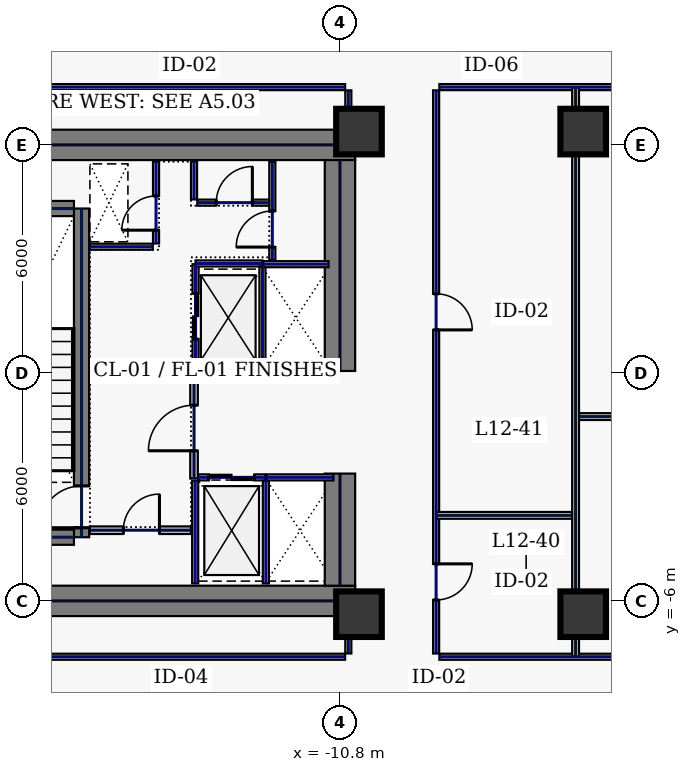
"""IFC4 building model, lengths in metres.
Left out: names, types, materials, properties, quantities, classifications, styles, units other than length and angle.
Written with IfcOpenShell. Run it as: python <this file> out.ifc"""

import sys

from ifc_helpers import new_model, si_unit, direction, frame, frame_2d, origin, origin_2d, place, context, subcontext, project, spatial, rectangle, hollow_rectangle, extrude, element, fill, save


model = new_model("IFC4")
c1 = context("Model", 3, precision=1e-05, world=origin(), true_north=direction((0.0, 1.0)))
c2 = subcontext(c1, "Body", "Model", "MODEL_VIEW")
j1 = project(units=[si_unit("LENGTHUNIT", "METRE"), si_unit("PLANEANGLEUNIT", "RADIAN")], contexts=[c1])
p1 = place(None, origin())
s1 = spatial("IfcSite", under=j1, at=p1, CompositionType="ELEMENT")
p2 = place(p1, origin())
s2 = spatial("IfcBuilding", under=s1, at=p2, CompositionType="ELEMENT")
p3 = place(p2, frame((0.0, 0.0, 59.4)))
s3 = spatial("IfcBuildingStorey", under=s2, at=p3, CompositionType="ELEMENT", Elevation=59.4)
for number, where, z_axis, x_axis in (
    (1, (-22.0, 6.0, 0.0), (0.0, 0.0, 1.0), (1.0, 0.0, 0.0)),
    (2, (-22.0, -6.0, 0.0), (0.0, 0.0, 1.0), (1.0, 0.0, 0.0)),
):
    element("IfcWall", number, at=place(p3, frame(where, z_axis=z_axis, x_axis=x_axis)), inside=s3, PredefinedType="SHEAR", context=c2, shape_type="SweptSolid", body=[
        extrude(rectangle(XDim=11.6, YDim=0.8, at=frame_2d((5.8, 0.0))), origin(), (0.0, 0.0, 1.0), 3.74),
    ])
p4 = place(p3, frame((-10.8, -5.6, 0.0), z_axis=(0.0, 0.0, 1.0), x_axis=(0.0, 1.0, 0.0)))
e3 = element("IfcWall", 3, at=p4, inside=s3, PredefinedType="SHEAR", context=c2, shape_type="SweptSolid", body=[
    extrude(rectangle(XDim=2.95, YDim=0.8, at=frame_2d((1.475, 0.0))), origin(), (0.0, 0.0, 1.0), 3.74),
])
p5 = place(p3, frame((-10.8, 0.05, 0.0), z_axis=(0.0, 0.0, 1.0), x_axis=(0.0, 1.0, 0.0)))
e4 = element("IfcWall", 4, at=p5, inside=s3, PredefinedType="SHEAR", context=c2, shape_type="SweptSolid", body=[
    extrude(rectangle(XDim=5.55, YDim=0.8, at=frame_2d((2.775, 0.0))), origin(), (0.0, 0.0, 1.0), 3.74),
])
p6 = place(p3, frame((-17.6, -4.325, 0.0), z_axis=(0.0, 0.0, 1.0), x_axis=(0.0, 1.0, 0.0)))
e5 = element("IfcWall", 5, at=p6, inside=s3, PredefinedType="SHEAR", context=c2, shape_type="SweptSolid", body=[
    extrude(rectangle(XDim=8.65, YDim=0.4, at=frame_2d((4.325, 0.0))), origin(), (0.0, 0.0, 1.0), 3.74),
])
p7 = place(p6, frame((0.25, 0.0, 0.0)))
e6 = element("IfcOpeningElement", 6, at=p7, cuts=e5, PredefinedType="OPENING", context=c2, shape_type="SweptSolid", body=[
    extrude(rectangle(XDim=1.1, YDim=2.2, at=frame_2d((0.55, 1.1))), frame((0.0, 0.21, 0.0), z_axis=(0.0, -1.0, 0.0), x_axis=(1.0, 0.0, 0.0)), (0.0, 0.0, 1.0), 0.42),
])
for number, where, z_axis, x_axis in (
    (7, (-21.2, -4.325, 0.0), (0.0, 0.0, 1.0), (1.0, 0.0, 0.0)),
    (8, (-21.2, 4.325, 0.0), (0.0, 0.0, 1.0), (1.0, 0.0, 0.0)),
):
    element("IfcWall", number, at=place(p3, frame(where, z_axis=z_axis, x_axis=x_axis)), inside=s3, PredefinedType="SHEAR", context=c2, shape_type="SweptSolid", body=[
        extrude(rectangle(XDim=3.4, YDim=0.4, at=frame_2d((1.7, 0.0))), origin(), (0.0, 0.0, 1.0), 3.74),
    ])
for number, where, z_axis, x_axis in (
    (9, (-10.3, -6.35, 0.0), (0.0, 0.0, 1.0), (1.0, 0.0, 0.0)),
    (10, (-10.3, 6.35, 0.0), (0.0, 0.0, 1.0), (1.0, 0.0, 0.0)),
    (11, (-4.4, -6.35, 0.0), (0.0, 0.0, 1.0), (1.0, 0.0, 0.0)),
    (12, (-4.4, 6.35, 0.0), (0.0, 0.0, 1.0), (1.0, 0.0, 0.0)),
):
    element("IfcColumn", number, at=place(p3, frame(where, z_axis=z_axis, x_axis=x_axis)), inside=s3, PredefinedType="COLUMN", context=c2, shape_type="SweptSolid", body=[
        extrude(hollow_rectangle(XDim=1.2, YDim=1.2, WallThickness=0.05, at=origin_2d()), origin(), (0.0, 0.0, 1.0), 3.74),
    ])
p8 = place(p3, frame((-14.6, 0.12, 0.0), z_axis=(0.0, 0.0, 1.0), x_axis=(0.0, 1.0, 0.0)))
e13 = element("IfcWall", 13, at=p8, inside=s3, PredefinedType="PARTITIONING", context=c2, shape_type="SweptSolid", body=[
    extrude(rectangle(XDim=2.74, YDim=0.16, at=frame_2d((1.37, 0.0))), origin(), (0.0, 0.0, 1.0), 3.74),
])
p9 = place(p8, frame((0.77, 0.0, 0.0)))
e14 = element("IfcOpeningElement", 14, at=p9, cuts=e13, PredefinedType="OPENING", context=c2, shape_type="SweptSolid", body=[
    extrude(rectangle(XDim=1.2, YDim=2.2, at=frame_2d((0.6, 1.1))), frame((0.0, 0.09, 0.0), z_axis=(0.0, -1.0, 0.0), x_axis=(1.0, 0.0, 0.0)), (0.0, 0.0, 1.0), 0.18),
])
for number, where, z_axis, x_axis in (
    (15, (-14.6, 0.1, 0.0), (0.0, 0.0, 1.0), (1.0, 0.0, 0.0)),
    (16, (-14.6, 2.88, 0.0), (0.0, 0.0, 1.0), (1.0, 0.0, 0.0)),
):
    element("IfcWall", number, at=place(p3, frame(where, z_axis=z_axis, x_axis=x_axis)), inside=s3, PredefinedType="PARTITIONING", context=c2, shape_type="SweptSolid", body=[
        extrude(rectangle(XDim=1.76, YDim=0.16, at=frame_2d((0.88, 0.0))), origin(), (0.0, 0.0, 1.0), 3.74),
    ])
p10 = place(p3, frame((-12.84, 0.18, 0.0), z_axis=(0.0, 0.0, 1.0), x_axis=(0.0, 1.0, 0.0)))
e17 = element("IfcWall", 17, at=p10, inside=s3, PredefinedType="PARTITIONING", context=c2, shape_type="SweptSolid", body=[
    extrude(rectangle(XDim=2.62, YDim=0.16, at=frame_2d((1.31, 0.0))), origin(), (0.0, 0.0, 1.0), 3.74),
])
p11 = place(p3, frame((-14.53, -2.75, 0.0), z_axis=(0.0, 0.0, 1.0), x_axis=(1.0, 0.0, 0.0)))
e18 = element("IfcWall", 18, at=p11, inside=s3, PredefinedType="PARTITIONING", context=c2, shape_type="SweptSolid", body=[
    extrude(rectangle(XDim=1.76, YDim=0.16, at=frame_2d((0.88, 0.0))), origin(), (0.0, 0.0, 1.0), 3.74),
])
p12 = place(p11, frame((0.28, 0.0, 0.0)))
e19 = element("IfcOpeningElement", 19, at=p12, cuts=e18, PredefinedType="OPENING", context=c2, shape_type="SweptSolid", body=[
    extrude(rectangle(XDim=1.2, YDim=2.2, at=frame_2d((0.6, 1.1))), frame((0.0, 0.09, 0.0), z_axis=(0.0, -1.0, 0.0), x_axis=(1.0, 0.0, 0.0)), (0.0, 0.0, 1.0), 0.18),
])
for number, where, z_axis, x_axis in (
    (20, (-12.75, -5.54, 0.0), (0.0, 0.0, 1.0), (0.0, 1.0, 0.0)),
    (21, (-14.61, -5.54, 0.0), (0.0, 0.0, 1.0), (0.0, 1.0, 0.0)),
):
    element("IfcWall", number, at=place(p3, frame(where, z_axis=z_axis, x_axis=x_axis)), inside=s3, PredefinedType="PARTITIONING", context=c2, shape_type="SweptSolid", body=[
        extrude(rectangle(XDim=2.7, YDim=0.16, at=frame_2d((1.35, 0.0))), origin(), (0.0, 0.0, 1.0), 3.74),
    ])
p13 = place(p3, frame((-12.73, -2.75, 0.0), z_axis=(0.0, 0.0, 1.0), x_axis=(1.0, 0.0, 0.0)))
e22 = element("IfcWall", 22, at=p13, inside=s3, PredefinedType="PARTITIONING", context=c2, shape_type="SweptSolid", body=[
    extrude(rectangle(XDim=1.76, YDim=0.16, at=frame_2d((0.88, 0.0))), origin(), (0.0, 0.0, 1.0), 3.74),
])
for number, where, z_axis, x_axis in (
    (23, (-12.82, 0.06, 0.0), (0.0, 0.0, 1.0), (1.0, 0.0, 0.0)),
    (24, (-12.82, 2.86, 0.0), (0.0, 0.0, 1.0), (1.0, 0.0, 0.0)),
):
    element("IfcWall", number, at=place(p3, frame(where, z_axis=z_axis, x_axis=x_axis)), inside=s3, PredefinedType="PARTITIONING", context=c2, shape_type="SweptSolid", body=[
        extrude(rectangle(XDim=1.72, YDim=0.16, at=frame_2d((0.86, 0.0))), origin(), (0.0, 0.0, 1.0), 3.74),
    ])
p14 = place(p3, frame((-15.64, 3.405, 0.0), z_axis=(0.0, 0.0, 1.0), x_axis=(0.0, 1.0, 0.0)))
e25 = element("IfcWall", 25, at=p14, inside=s3, PredefinedType="PARTITIONING", context=c2, shape_type="SweptSolid", body=[
    extrude(rectangle(XDim=2.155, YDim=0.16, at=frame_2d((1.078, 0.0))), origin(), (0.0, 0.0, 1.0), 3.74),
])
p15 = place(p14, frame((0.35, 0.0, 0.0)))
e26 = element("IfcOpeningElement", 26, at=p15, cuts=e25, PredefinedType="OPENING", context=c2, shape_type="SweptSolid", body=[
    extrude(rectangle(XDim=0.9, YDim=2.2, at=frame_2d((0.45, 1.1))), frame((0.0, 0.09, 0.0), z_axis=(0.0, -1.0, 0.0), x_axis=(1.0, 0.0, 0.0)), (0.0, 0.0, 1.0), 0.18),
])
p16 = place(p3, frame((-17.38, 3.32, 0.0), z_axis=(0.0, 0.0, 1.0), x_axis=(1.0, 0.0, 0.0)))
e27 = element("IfcWall", 27, at=p16, inside=s3, PredefinedType="PARTITIONING", context=c2, shape_type="SweptSolid", body=[
    extrude(rectangle(XDim=1.655, YDim=0.16, at=frame_2d((0.827, 0.0))), origin(), (0.0, 0.0, 1.0), 3.74),
])
p17 = place(p3, frame((-17.38, -4.14, 0.0), z_axis=(0.0, 0.0, 1.0), x_axis=(1.0, 0.0, 0.0)))
e28 = element("IfcWall", 28, at=p17, inside=s3, PredefinedType="SOLIDWALL", context=c2, shape_type="SweptSolid", body=[
    extrude(rectangle(XDim=2.66, YDim=0.2, at=frame_2d((1.33, 0.0))), origin(), (0.0, 0.0, 1.0), 3.74),
])
p18 = place(p17, frame((0.88, 0.0, 0.0)))
e29 = element("IfcOpeningElement", 29, at=p18, cuts=e28, PredefinedType="OPENING", context=c2, shape_type="SweptSolid", body=[
    extrude(rectangle(XDim=0.95, YDim=2.2, at=frame_2d((0.475, 1.1))), frame((0.0, 0.11, 0.0), z_axis=(0.0, -1.0, 0.0), x_axis=(1.0, 0.0, 0.0)), (0.0, 0.0, 1.0), 0.22),
])
p19 = place(p3, frame((-12.58, 2.96, 0.0), z_axis=(0.0, 0.0, 1.0), x_axis=(0.0, 1.0, 0.0)))
e30 = element("IfcWall", 30, at=p19, inside=s3, PredefinedType="PARTITIONING", context=c2, shape_type="SweptSolid", body=[
    extrude(rectangle(XDim=2.6, YDim=0.16, at=frame_2d((1.3, 0.0))), origin(), (0.0, 0.0, 1.0), 3.74),
])
p20 = place(p19, frame((0.35, 0.0, 0.0)))
e31 = element("IfcOpeningElement", 31, at=p20, cuts=e30, PredefinedType="OPENING", context=c2, shape_type="SweptSolid", body=[
    extrude(rectangle(XDim=0.95, YDim=2.2, at=frame_2d((0.475, 1.1))), frame((0.0, 0.09, 0.0), z_axis=(0.0, -1.0, 0.0), x_axis=(1.0, 0.0, 0.0)), (0.0, 0.0, 1.0), 0.18),
])
p21 = place(p3, frame((-14.555, 4.48, 0.0), z_axis=(0.0, 0.0, 1.0), x_axis=(1.0, 0.0, 0.0)))
e32 = element("IfcWall", 32, at=p21, inside=s3, PredefinedType="PARTITIONING", context=c2, shape_type="SweptSolid", body=[
    extrude(rectangle(XDim=1.89, YDim=0.16, at=frame_2d((0.945, 0.0))), origin(), (0.0, 0.0, 1.0), 3.74),
])
p22 = place(p21, frame((0.5, 0.0, 0.0)))
e33 = element("IfcOpeningElement", 33, at=p22, cuts=e32, PredefinedType="OPENING", context=c2, shape_type="SweptSolid", body=[
    extrude(rectangle(XDim=0.95, YDim=2.2, at=frame_2d((0.475, 1.1))), frame((0.0, 0.09, 0.0), z_axis=(0.0, -1.0, 0.0), x_axis=(1.0, 0.0, 0.0)), (0.0, 0.0, 1.0), 0.18),
])
p23 = place(p3, frame((-14.64, 4.565, 0.0), z_axis=(0.0, 0.0, 1.0), x_axis=(0.0, 1.0, 0.0)))
e34 = element("IfcWall", 34, at=p23, inside=s3, PredefinedType="PARTITIONING", context=c2, shape_type="SweptSolid", body=[
    extrude(rectangle(XDim=0.995, YDim=0.16, at=frame_2d((0.498, 0.0))), origin(), (0.0, 0.0, 1.0), 3.74),
])
p24 = place(p3, frame((-14.64, -2.78, 0.0), z_axis=(0.0, 0.0, 1.0), x_axis=(0.0, 1.0, 0.0)))
e35 = element("IfcWall", 35, at=p24, inside=s3, PredefinedType="SOLIDWALL", context=c2, shape_type="SweptSolid", body=[
    extrude(rectangle(XDim=2.82, YDim=0.2, at=frame_2d((1.41, 0.0))), origin(), (0.0, 0.0, 1.0), 3.74),
])
p25 = place(p24, frame((0.73, 0.0, 0.0)))
e36 = element("IfcOpeningElement", 36, at=p25, cuts=e35, PredefinedType="OPENING", context=c2, shape_type="SweptSolid", body=[
    extrude(rectangle(XDim=1.2, YDim=2.2, at=frame_2d((0.6, 1.1))), frame((0.0, 0.11, 0.0), z_axis=(0.0, -1.0, 0.0), x_axis=(1.0, 0.0, 0.0)), (0.0, 0.0, 1.0), 0.22),
])
p26 = place(p3, frame((8.185, 7.52, 0.0), z_axis=(0.0, 0.0, 1.0), x_axis=(-1.0, 0.0, 0.0)))
e37 = element("IfcWall", 37, at=p26, inside=s3, PredefinedType="PARTITIONING", context=c2, shape_type="SweptSolid", body=[
    extrude(rectangle(XDim=16.37, YDim=0.16, at=frame_2d((8.185, 0.0))), origin(), (0.0, 0.0, 1.0), 3.74),
])
p27 = place(p26, frame((7.795, 0.0, 0.0)))
e38 = element("IfcOpeningElement", 38, at=p27, cuts=e37, PredefinedType="OPENING", context=c2, shape_type="SweptSolid", body=[
    extrude(rectangle(XDim=0.95, YDim=2.2, at=frame_2d((0.475, 1.1))), frame((0.0, 0.09, 0.0), z_axis=(0.0, -1.0, 0.0), x_axis=(1.0, 0.0, 0.0)), (0.0, 0.0, 1.0), 0.18),
])
p28 = place(p3, frame((-8.27, 7.435, 0.0), z_axis=(0.0, 0.0, 1.0), x_axis=(0.0, -1.0, 0.0)))
e39 = element("IfcWall", 39, at=p28, inside=s3, PredefinedType="PARTITIONING", context=c2, shape_type="SweptSolid", body=[
    extrude(rectangle(XDim=14.82, YDim=0.16, at=frame_2d((7.41, 0.0))), origin(), (0.0, 0.0, 1.0), 3.74),
])
p29 = place(p28, frame((12.461, 0.0, 0.0)))
e40 = element("IfcOpeningElement", 40, at=p29, cuts=e39, PredefinedType="OPENING", context=c2, shape_type="SweptSolid", body=[
    extrude(rectangle(XDim=0.95, YDim=2.2, at=frame_2d((0.475, 1.1))), frame((0.0, 0.09, 0.0), z_axis=(0.0, -1.0, 0.0), x_axis=(1.0, 0.0, 0.0)), (0.0, 0.0, 1.0), 0.18),
])
p30 = place(p28, frame((5.354, 0.0, 0.0)))
e41 = element("IfcOpeningElement", 41, at=p30, cuts=e39, PredefinedType="OPENING", context=c2, shape_type="SweptSolid", body=[
    extrude(rectangle(XDim=0.95, YDim=2.2, at=frame_2d((0.475, 1.1))), frame((0.0, 0.09, 0.0), z_axis=(0.0, -1.0, 0.0), x_axis=(1.0, 0.0, 0.0)), (0.0, 0.0, 1.0), 0.18),
])
p31 = place(p3, frame((-8.185, -7.47, 0.0), z_axis=(0.0, 0.0, 1.0), x_axis=(1.0, 0.0, 0.0)))
e42 = element("IfcWall", 42, at=p31, inside=s3, PredefinedType="PARTITIONING", context=c2, shape_type="SweptSolid", body=[
    extrude(rectangle(XDim=16.37, YDim=0.16, at=frame_2d((8.185, 0.0))), origin(), (0.0, 0.0, 1.0), 3.74),
])
p32 = place(p31, frame((7.795, 0.0, 0.0)))
e43 = element("IfcOpeningElement", 43, at=p32, cuts=e42, PredefinedType="OPENING", context=c2, shape_type="SweptSolid", body=[
    extrude(rectangle(XDim=0.95, YDim=2.2, at=frame_2d((0.475, 1.1))), frame((0.0, 0.09, 0.0), z_axis=(0.0, -1.0, 0.0), x_axis=(1.0, 0.0, 0.0)), (0.0, 0.0, 1.0), 0.18),
])
p33 = place(p31, frame((14.336, 0.0, 0.0)))
e44 = element("IfcOpeningElement", 44, at=p33, cuts=e42, PredefinedType="OPENING", context=c2, shape_type="SweptSolid", body=[
    extrude(rectangle(XDim=0.95, YDim=2.2, at=frame_2d((0.475, 1.1))), frame((0.0, 0.09, 0.0), z_axis=(0.0, -1.0, 0.0), x_axis=(1.0, 0.0, 0.0)), (0.0, 0.0, 1.0), 0.18),
])
p34 = place(p3, frame((-10.58, -7.385, 0.0), z_axis=(0.0, 0.0, 1.0), x_axis=(0.0, 1.0, 0.0)))
e45 = element("IfcWall", 45, at=p34, inside=s3, PredefinedType="PARTITIONING", context=c2, shape_type="SweptSolid", body=[
    extrude(rectangle(XDim=0.965, YDim=0.16, at=frame_2d((0.482, 0.0))), origin(), (0.0, 0.0, 1.0), 3.74),
])
p35 = place(p3, frame((-10.58, 6.42, 0.0), z_axis=(0.0, 0.0, 1.0), x_axis=(0.0, 1.0, 0.0)))
e46 = element("IfcWall", 46, at=p35, inside=s3, PredefinedType="PARTITIONING", context=c2, shape_type="SweptSolid", body=[
    extrude(rectangle(XDim=1.015, YDim=0.16, at=frame_2d((0.508, 0.0))), origin(), (0.0, 0.0, 1.0), 3.74),
])
for number, where, z_axis, x_axis in (
    (47, (-10.665, 7.52, 0.0), (0.0, 0.0, 1.0), (-1.0, 0.0, 0.0)),
    (48, (-27.185, -7.47, 0.0), (0.0, 0.0, 1.0), (1.0, 0.0, 0.0)),
):
    element("IfcWall", number, at=place(p3, frame(where, z_axis=z_axis, x_axis=x_axis)), inside=s3, PredefinedType="PARTITIONING", context=c2, shape_type="SweptSolid", body=[
        extrude(rectangle(XDim=16.52, YDim=0.16, at=frame_2d((8.26, 0.0))), origin(), (0.0, 0.0, 1.0), 3.74),
    ])
p36 = place(p3, frame((-4.6, -7.465, 0.0), z_axis=(0.0, 0.0, 1.0), x_axis=(0.0, 1.0, 0.0)))
e49 = element("IfcWall", 49, at=p36, inside=s3, PredefinedType="PARTITIONING", context=c2, shape_type="SweptSolid", body=[
    extrude(rectangle(XDim=14.98, YDim=0.18, at=frame_2d((7.49, 0.0))), origin(), (0.0, 0.0, 1.0), 2.935),
])
p37 = place(p3, frame((-4.505, -1.15, 0.0), z_axis=(0.0, 0.0, 1.0), x_axis=(1.0, 0.0, 0.0)))
e50 = element("IfcWall", 50, at=p37, inside=s3, PredefinedType="PARTITIONING", context=c2, shape_type="SweptSolid", body=[
    extrude(rectangle(XDim=9.01, YDim=0.18, at=frame_2d((4.505, 0.0))), origin(), (0.0, 0.0, 1.0), 3.74),
])
p38 = place(p3, frame((-8.265, -3.75, 0.0), z_axis=(0.0, 0.0, 1.0), x_axis=(1.0, 0.0, 0.0)))
e51 = element("IfcWall", 51, at=p38, inside=s3, PredefinedType="PARTITIONING", context=c2, shape_type="SweptSolid", body=[
    extrude(rectangle(XDim=3.57, YDim=0.18, at=frame_2d((1.785, 0.0))), origin(), (0.0, 0.0, 1.0), 3.74),
])
p39 = place(p7, origin())
e52 = element("IfcDoor", 52, at=p39, inside=s3, OperationType="SINGLE_SWING_LEFT", PredefinedType="DOOR", context=c2, shape_type="SweptSolid", body=[
    extrude(rectangle(XDim=1.1, YDim=2.2, at=frame_2d((0.55, 1.1))), frame((0.0, 0.025, 0.0), z_axis=(0.0, -1.0, 0.0), x_axis=(1.0, 0.0, 0.0)), (0.0, 0.0, 1.0), 0.05),
])
fill(e6, e52)
p40 = place(p9, origin())
e53 = element("IfcDoor", 53, at=p40, inside=s3, OperationType="SLIDING_TO_LEFT", PredefinedType="DOOR", context=c2, shape_type="SweptSolid", body=[
    extrude(rectangle(XDim=1.2, YDim=2.2, at=frame_2d((0.6, 1.1))), frame((0.0, 0.025, 0.0), z_axis=(0.0, -1.0, 0.0), x_axis=(1.0, 0.0, 0.0)), (0.0, 0.0, 1.0), 0.05),
])
fill(e14, e53)
p41 = place(p12, origin())
e54 = element("IfcDoor", 54, at=p41, inside=s3, OperationType="SLIDING_TO_LEFT", PredefinedType="DOOR", context=c2, shape_type="SweptSolid", body=[
    extrude(rectangle(XDim=1.2, YDim=2.2, at=frame_2d((0.6, 1.1))), frame((0.0, 0.025, 0.0), z_axis=(0.0, -1.0, 0.0), x_axis=(1.0, 0.0, 0.0)), (0.0, 0.0, 1.0), 0.05),
])
fill(e19, e54)
p42 = place(p15, origin())
e55 = element("IfcDoor", 55, at=p42, inside=s3, OperationType="SINGLE_SWING_LEFT", PredefinedType="DOOR", context=c2, shape_type="SweptSolid", body=[
    extrude(rectangle(XDim=0.9, YDim=2.2, at=frame_2d((0.45, 1.1))), frame((0.0, 0.025, 0.0), z_axis=(0.0, -1.0, 0.0), x_axis=(1.0, 0.0, 0.0)), (0.0, 0.0, 1.0), 0.05),
])
fill(e26, e55)
p43 = place(p18, origin())
e56 = element("IfcDoor", 56, at=p43, inside=s3, OperationType="SINGLE_SWING_RIGHT", PredefinedType="DOOR", context=c2, shape_type="SweptSolid", body=[
    extrude(rectangle(XDim=0.95, YDim=2.2, at=frame_2d((0.475, 1.1))), frame((0.0, 0.025, 0.0), z_axis=(0.0, -1.0, 0.0), x_axis=(1.0, 0.0, 0.0)), (0.0, 0.0, 1.0), 0.05),
])
fill(e29, e56)
p44 = place(p20, origin())
e57 = element("IfcDoor", 57, at=p44, inside=s3, OperationType="SINGLE_SWING_LEFT", PredefinedType="DOOR", context=c2, shape_type="SweptSolid", body=[
    extrude(rectangle(XDim=0.95, YDim=2.2, at=frame_2d((0.475, 1.1))), frame((0.0, 0.025, 0.0), z_axis=(0.0, -1.0, 0.0), x_axis=(1.0, 0.0, 0.0)), (0.0, 0.0, 1.0), 0.05),
])
fill(e31, e57)
p45 = place(p22, origin())
e58 = element("IfcDoor", 58, at=p45, inside=s3, OperationType="SINGLE_SWING_RIGHT", PredefinedType="DOOR", context=c2, shape_type="SweptSolid", body=[
    extrude(rectangle(XDim=0.95, YDim=2.2, at=frame_2d((0.475, 1.1))), frame((0.0, 0.025, 0.0), z_axis=(0.0, -1.0, 0.0), x_axis=(1.0, 0.0, 0.0)), (0.0, 0.0, 1.0), 0.05),
])
fill(e33, e58)
p46 = place(p25, origin())
e59 = element("IfcDoor", 59, at=p46, inside=s3, OperationType="SINGLE_SWING_LEFT", PredefinedType="DOOR", context=c2, shape_type="SweptSolid", body=[
    extrude(rectangle(XDim=1.2, YDim=2.2, at=frame_2d((0.6, 1.1))), frame((0.0, 0.025, 0.0), z_axis=(0.0, -1.0, 0.0), x_axis=(1.0, 0.0, 0.0)), (0.0, 0.0, 1.0), 0.05),
])
fill(e36, e59)
p47 = place(p29, origin())
e60 = element("IfcDoor", 60, at=p47, inside=s3, OperationType="SINGLE_SWING_LEFT", PredefinedType="DOOR", context=c2, shape_type="SweptSolid", body=[
    extrude(rectangle(XDim=0.95, YDim=2.2, at=frame_2d((0.475, 1.1))), frame((0.0, 0.025, 0.0), z_axis=(0.0, -1.0, 0.0), x_axis=(1.0, 0.0, 0.0)), (0.0, 0.0, 1.0), 0.05),
])
fill(e40, e60)
p48 = place(p30, origin())
e61 = element("IfcDoor", 61, at=p48, inside=s3, OperationType="SINGLE_SWING_RIGHT", PredefinedType="DOOR", context=c2, shape_type="SweptSolid", body=[
    extrude(rectangle(XDim=0.95, YDim=2.2, at=frame_2d((0.475, 1.1))), frame((0.0, 0.025, 0.0), z_axis=(0.0, -1.0, 0.0), x_axis=(1.0, 0.0, 0.0)), (0.0, 0.0, 1.0), 0.05),
])
fill(e41, e61)
save(model, sys.argv[1])
